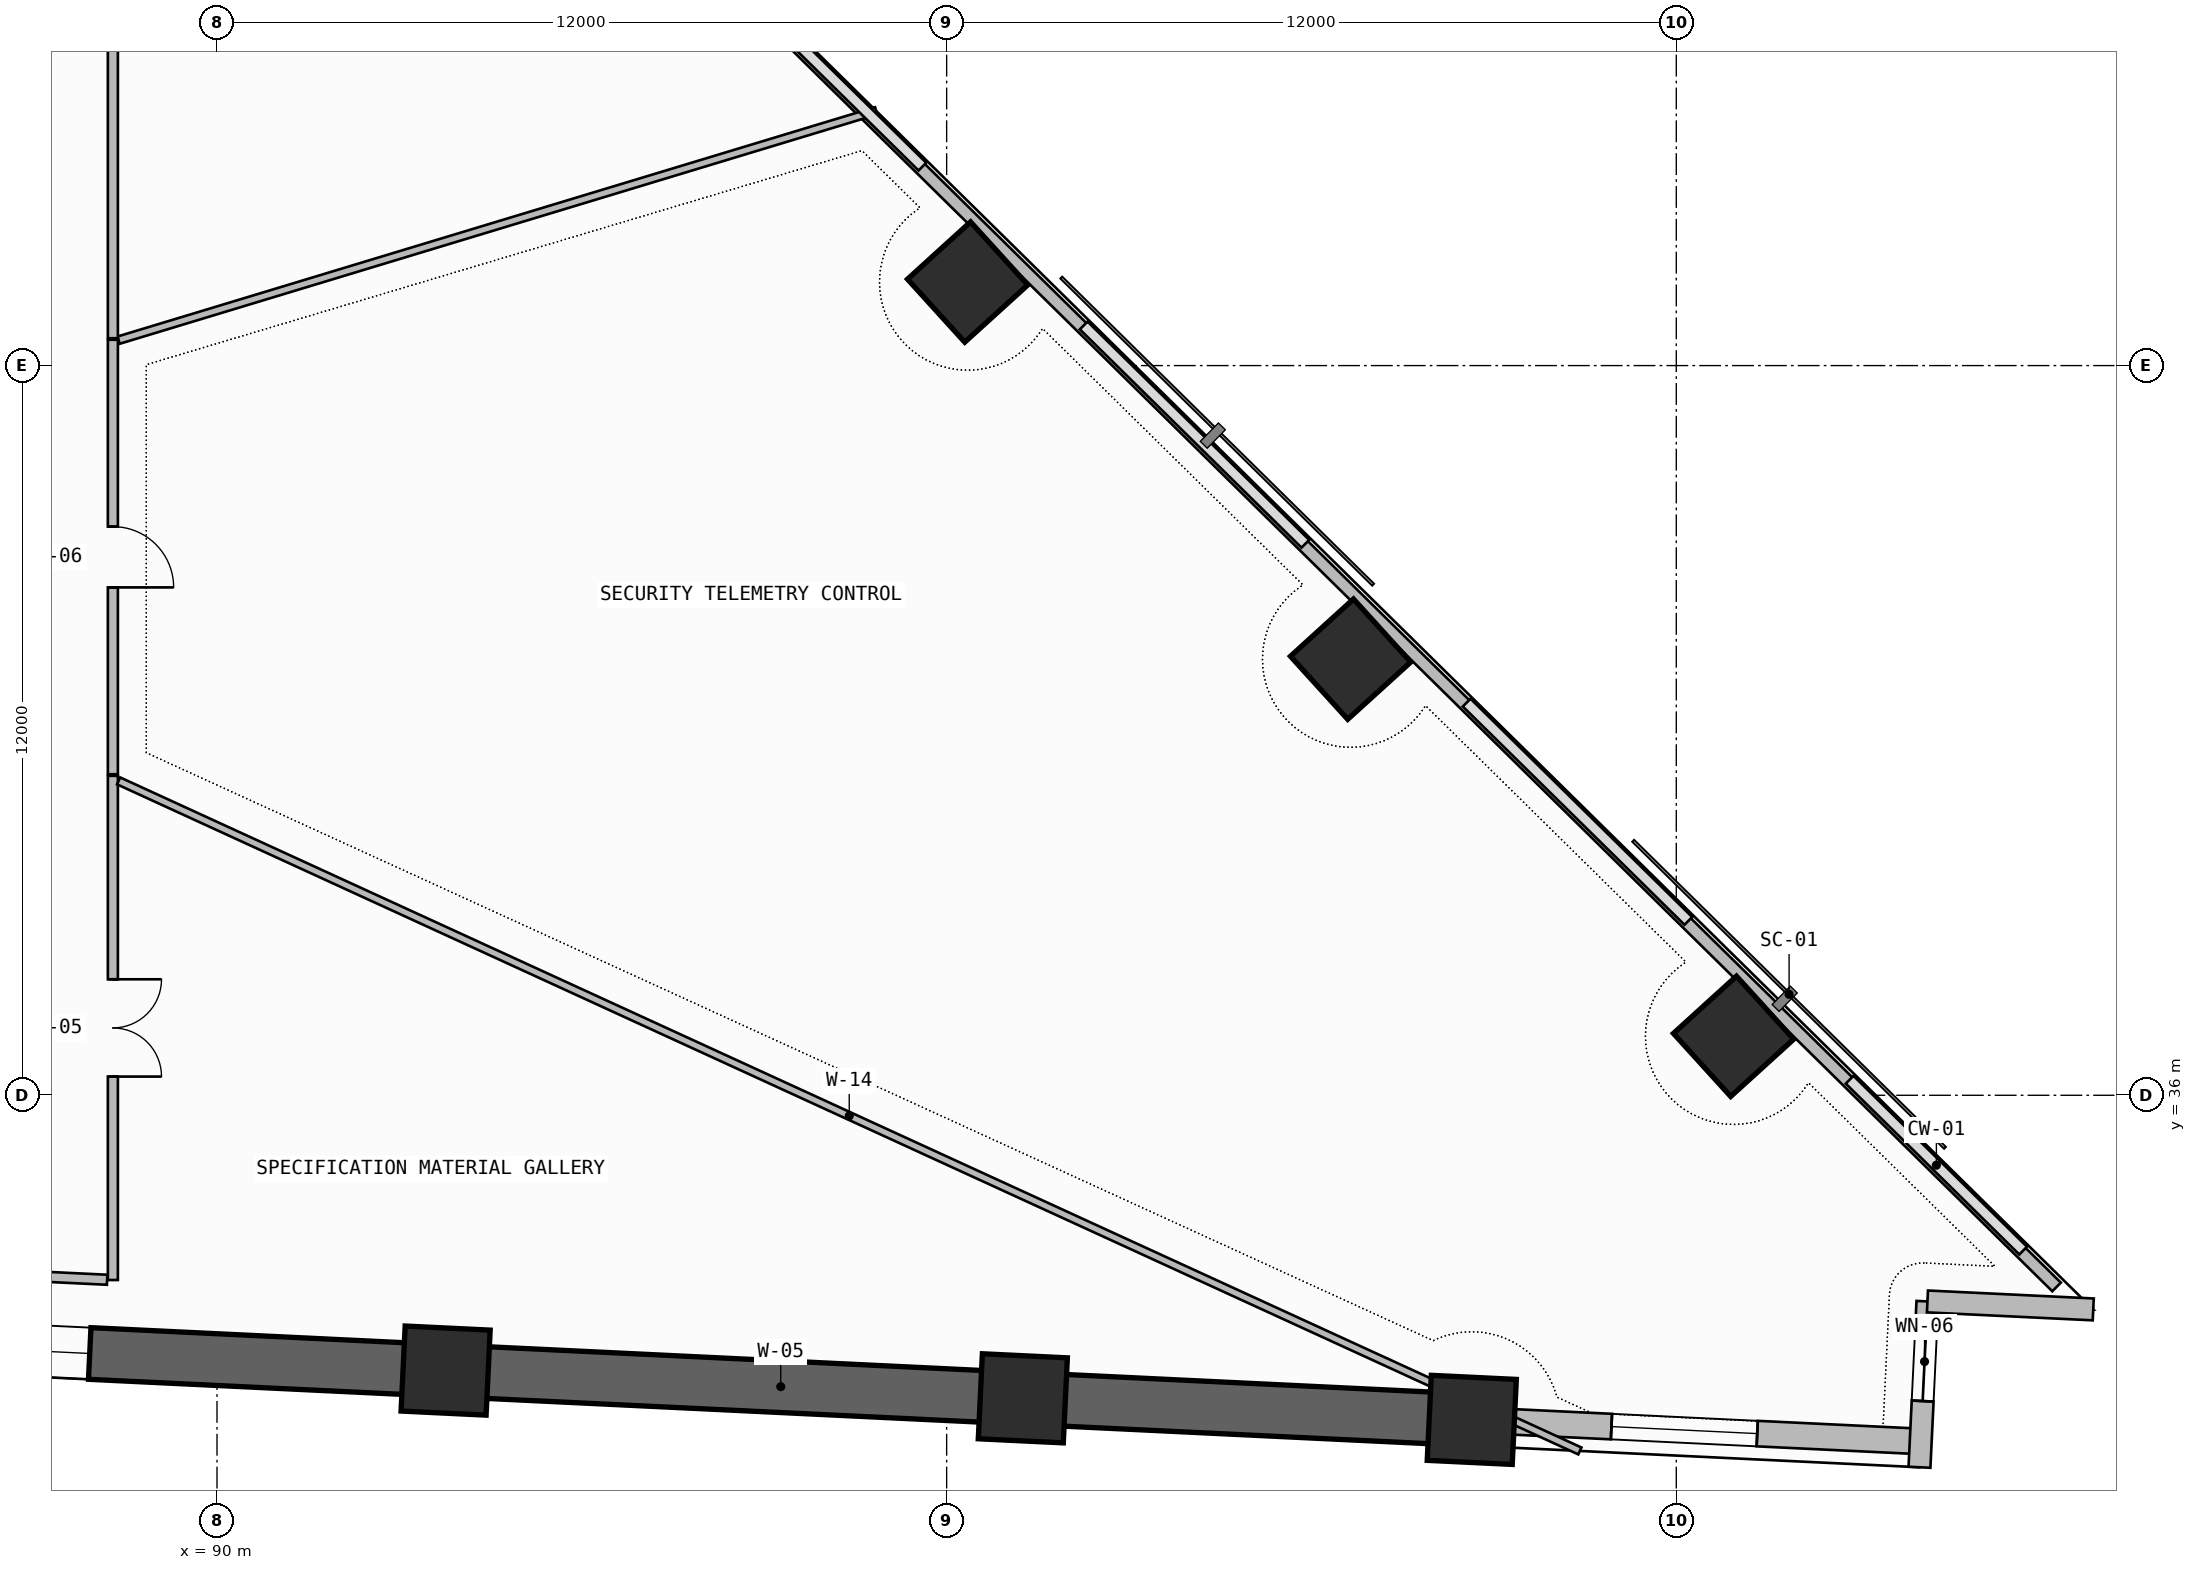
"""IFC4 building model, lengths in metres.
Left out: names, types, materials, properties, quantities, classifications, styles, units other than length and angle.
Written with IfcOpenShell. Run it as: python <this file> out.ifc"""

import sys

from ifc_helpers import new_model, si_unit, direction, frame, frame_2d, origin, origin_2d, place, context, subcontext, project, spatial, rectangle, extrude, element, fill, save


model = new_model("IFC4")
c1 = context("Model", 3, precision=1e-05, world=origin(), true_north=direction((0.0, 1.0)))
c2 = subcontext(c1, "Body", "Model", "MODEL_VIEW")
j1 = project(units=[si_unit("LENGTHUNIT", "METRE"), si_unit("PLANEANGLEUNIT", "RADIAN")], contexts=[c1])
p1 = place(None, origin())
s1 = spatial("IfcSite", under=j1, at=p1, CompositionType="ELEMENT")
p2 = place(p1, origin())
s2 = spatial("IfcBuilding", under=s1, at=p2, CompositionType="ELEMENT")
p3 = place(p2, frame((0.0, 0.0, 44.7)))
s3 = spatial("IfcBuildingStorey", under=s2, at=p3, CompositionType="ELEMENT", Elevation=44.7)
for number, where, z_axis, x_axis in (
    (1, (93.76, 31.472, 0.0), (0.0, 0.0, 1.0), (-0.999, 0.048, 0.0)),
    (2, (103.253, 31.017, 0.0), (0.0, 0.0, 1.0), (-0.999, 0.048, 0.0)),
    (3, (110.636, 30.662, 0.0), (0.0, 0.0, 1.0), (-0.999, 0.048, 0.0)),
    (4, (114.942, 36.97, 0.0), (0.0, 0.0, 1.0), (0.74, 0.672, 0.0)),
    (5, (108.644, 43.172, 0.0), (0.0, 0.0, 1.0), (0.74, 0.672, 0.0)),
    (6, (102.345, 49.374, 0.0), (0.0, 0.0, 1.0), (0.74, 0.672, 0.0)),
):
    element("IfcColumn", number, at=place(p3, frame(where, z_axis=z_axis, x_axis=x_axis)), inside=s3, PredefinedType="COLUMN", context=c2, shape_type="SweptSolid", body=[
        extrude(rectangle(XDim=1.4, YDim=1.4, at=origin_2d()), origin(), (0.0, 0.0, 1.0), 3.6),
    ])
p4 = place(p3, frame((83.212, 31.979, -0.2), z_axis=(0.0, 0.0, 1.0), x_axis=(0.998848235141, -0.047981279227, 0.0)))
e7 = element("IfcWall", 7, at=p4, inside=s3, PredefinedType="SHEAR", context=c2, shape_type="SweptSolid", body=[
    extrude(rectangle(XDim=27.456, YDim=0.85, at=frame_2d((13.728, 0.0))), origin(), (0.0, 0.0, 1.0), 3.54),
])
p5 = place(p4, frame((2.3, 0.0, 1.2)))
e8 = element("IfcOpeningElement", 8, at=p5, cuts=e7, PredefinedType="OPENING", context=c2, shape_type="SweptSolid", body=[
    extrude(rectangle(XDim=2.4, YDim=0.9, at=frame_2d((1.2, 0.45))), frame((0.0, 0.435, 0.0), z_axis=(0.0, -1.0, 0.0), x_axis=(1.0, 0.0, 0.0)), (0.0, 0.0, 1.0), 0.87),
])
p6 = place(p3, frame((110.636, 30.662, 0.0), z_axis=(0.0, 0.0, 1.0), x_axis=(0.998847872759, -0.047988822508, 0.0)))
e9 = element("IfcWall", 9, at=p6, inside=s3, PredefinedType="SOLIDWALL", context=c2, shape_type="SweptSolid", body=[
    extrude(rectangle(XDim=7.392, YDim=0.42, at=frame_2d((3.696, 0.0))), origin(), (0.0, 0.0, 1.0), 2.325),
])
p7 = place(p6, frame((2.3, 0.0, 1.2)))
e10 = element("IfcOpeningElement", 10, at=p7, cuts=e9, PredefinedType="OPENING", context=c2, shape_type="SweptSolid", body=[
    extrude(rectangle(XDim=2.4, YDim=0.9, at=frame_2d((1.2, 0.45))), frame((0.0, 0.22, 0.0), z_axis=(0.0, -1.0, 0.0), x_axis=(1.0, 0.0, 0.0)), (0.0, 0.0, 1.0), 0.44),
])
p8 = place(p3, frame((118.0, 29.883, 0.0), z_axis=(0.0, 0.0, 1.0), x_axis=(0.048024030708, 0.998846180588, 0.0)))
e11 = element("IfcWall", 11, at=p8, inside=s3, PredefinedType="SOLIDWALL", context=c2, shape_type="SweptSolid", body=[
    extrude(rectangle(XDim=2.73, YDim=0.36, at=frame_2d((1.365, 0.0))), origin(), (0.0, 0.0, 1.0), 3.34),
])
p9 = place(p8, frame((1.09, 0.0, 0.45)))
e12 = element("IfcOpeningElement", 12, at=p9, cuts=e11, PredefinedType="OPENING", context=c2, shape_type="SweptSolid", body=[
    extrude(rectangle(XDim=1.3, YDim=2.4, at=frame_2d((0.65, 1.2))), frame((0.0, 0.19, 0.0), z_axis=(0.0, -1.0, 0.0), x_axis=(1.0, 0.0, 0.0)), (0.0, 0.0, 1.0), 0.38),
])
p10 = place(p3, frame((118.131, 32.61, 0.0), z_axis=(0.0, 0.0, 1.0), x_axis=(0.998846180588, -0.048024030708, 0.0)))
e13 = element("IfcWall", 13, at=p10, inside=s3, PredefinedType="SOLIDWALL", context=c2, shape_type="SweptSolid", body=[
    extrude(rectangle(XDim=2.73, YDim=0.36, at=frame_2d((1.365, 0.0))), origin(), (0.0, 0.0, 1.0), 3.34),
])
p11 = place(p3, frame((120.254, 32.848, 0.0), z_axis=(0.0, 0.0, 1.0), x_axis=(-0.71254385441, 0.701627576099, 0.0)))
e14 = element("IfcWall", 14, at=p11, inside=s3, PredefinedType="PARAPET", context=c2, shape_type="SweptSolid", body=[
    extrude(rectangle(XDim=36.142, YDim=0.2, at=frame_2d((18.071, 0.0))), origin(), (0.0, 0.0, 1.0), 1.15),
])
p12 = place(p3, frame((88.288, 32.962, 0.0), z_axis=(0.0, 0.0, 1.0), x_axis=(0.0, 1.0, 0.0)))
e15 = element("IfcWall", 15, at=p12, inside=s3, PredefinedType="PARTITIONING", context=c2, shape_type="SweptSolid", body=[
    extrude(rectangle(XDim=8.291, YDim=0.165, at=frame_2d((4.146, 0.0))), origin(), (0.0, 0.0, 1.0), 2.725),
])
p13 = place(p12, frame((3.346, 0.0, 0.0)))
e16 = element("IfcOpeningElement", 16, at=p13, cuts=e15, PredefinedType="OPENING", context=c2, shape_type="SweptSolid", body=[
    extrude(rectangle(XDim=1.6, YDim=2.3, at=frame_2d((0.8, 1.15))), frame((0.0, 0.093, 0.0), z_axis=(0.0, -1.0, 0.0), x_axis=(1.0, 0.0, 0.0)), (0.0, 0.0, 1.0), 0.185),
])
p14 = place(p3, frame((86.3, 33.057, 0.0), z_axis=(0.0, 0.0, 1.0), x_axis=(0.9988449969, -0.048048643777, 0.0)))
e17 = element("IfcWall", 17, at=p14, inside=s3, PredefinedType="PARTITIONING", context=c2, shape_type="SweptSolid", body=[
    extrude(rectangle(XDim=1.895, YDim=0.165, at=frame_2d((0.948, 0.0))), origin(), (0.0, 0.0, 1.0), 3.34),
])
p15 = place(p3, frame((88.382, 41.17, 0.0), z_axis=(0.0, 0.0, 1.0), x_axis=(0.908996896227, -0.416802882248, 0.0)))
e18 = element("IfcWall", 18, at=p15, inside=s3, PredefinedType="PARTITIONING", context=c2, shape_type="SweptSolid", body=[
    extrude(rectangle(XDim=26.438, YDim=0.125, at=frame_2d((13.219, 0.0))), origin(), (0.0, 0.0, 1.0), 2.325),
])
p16 = place(p3, frame((88.288, 41.28, 0.0), z_axis=(0.0, 0.0, 1.0), x_axis=(0.0, 1.0, 0.0)))
e19 = element("IfcWall", 19, at=p16, inside=s3, PredefinedType="PARTITIONING", context=c2, shape_type="SweptSolid", body=[
    extrude(rectangle(XDim=7.145, YDim=0.165, at=frame_2d((3.573, 0.0))), origin(), (0.0, 0.0, 1.0), 2.725),
])
p17 = place(p16, frame((3.073, 0.0, 0.0)))
e20 = element("IfcOpeningElement", 20, at=p17, cuts=e19, PredefinedType="OPENING", context=c2, shape_type="SweptSolid", body=[
    extrude(rectangle(XDim=1.0, YDim=2.2, at=frame_2d((0.5, 1.1))), frame((0.0, 0.093, 0.0), z_axis=(0.0, -1.0, 0.0), x_axis=(1.0, 0.0, 0.0)), (0.0, 0.0, 1.0), 0.185),
])
p18 = place(p3, frame((88.382, 48.418, 0.0), z_axis=(0.0, 0.0, 1.0), x_axis=(0.957118216814, 0.289697633823, 0.0)))
e21 = element("IfcWall", 21, at=p18, inside=s3, PredefinedType="PARTITIONING", context=c2, shape_type="SweptSolid", body=[
    extrude(rectangle(XDim=13.016, YDim=0.125, at=frame_2d((6.508, 0.0))), origin(), (0.0, 0.0, 1.0), 2.725),
])
p19 = place(p3, frame((88.288, 48.45, 0.0), z_axis=(0.0, 0.0, 1.0), x_axis=(0.0, 1.0, 0.0)))
e22 = element("IfcWall", 22, at=p19, inside=s3, PredefinedType="PARTITIONING", context=c2, shape_type="SweptSolid", body=[
    extrude(rectangle(XDim=10.61, YDim=0.165, at=frame_2d((5.305, 0.0))), origin(), (0.0, 0.0, 1.0), 2.725),
])
p20 = place(p19, frame((4.805, 0.0, 0.0)))
e23 = element("IfcOpeningElement", 23, at=p20, cuts=e22, PredefinedType="OPENING", context=c2, shape_type="SweptSolid", body=[
    extrude(rectangle(XDim=1.0, YDim=2.2, at=frame_2d((0.5, 1.1))), frame((0.0, 0.093, 0.0), z_axis=(0.0, -1.0, 0.0), x_axis=(1.0, 0.0, 0.0)), (0.0, 0.0, 1.0), 0.185),
])
p21 = place(p5, origin())
e24 = element("IfcWindow", 24, at=p21, inside=s3, PartitioningType="SINGLE_PANEL", PredefinedType="WINDOW", context=c2, shape_type="SweptSolid", body=[
    extrude(rectangle(XDim=2.4, YDim=0.9, at=frame_2d((1.2, 0.45))), frame((0.0, 0.03, 0.0), z_axis=(0.0, -1.0, 0.0), x_axis=(1.0, 0.0, 0.0)), (0.0, 0.0, 1.0), 0.06),
])
fill(e8, e24)
p22 = place(p7, origin())
e25 = element("IfcWindow", 25, at=p22, inside=s3, PartitioningType="SINGLE_PANEL", PredefinedType="WINDOW", context=c2, shape_type="SweptSolid", body=[
    extrude(rectangle(XDim=2.4, YDim=0.9, at=frame_2d((1.2, 0.45))), frame((0.0, 0.03, 0.0), z_axis=(0.0, -1.0, 0.0), x_axis=(1.0, 0.0, 0.0)), (0.0, 0.0, 1.0), 0.06),
])
fill(e10, e25)
p23 = place(p9, origin())
e26 = element("IfcWindow", 26, at=p23, inside=s3, PartitioningType="SINGLE_PANEL", PredefinedType="WINDOW", context=c2, shape_type="SweptSolid", body=[
    extrude(rectangle(XDim=1.3, YDim=2.4, at=frame_2d((0.65, 1.2))), frame((0.0, 0.03, 0.0), z_axis=(0.0, -1.0, 0.0), x_axis=(1.0, 0.0, 0.0)), (0.0, 0.0, 1.0), 0.06),
])
fill(e12, e26)
p24 = place(p13, frame((1.6, 0.0, 0.0), z_axis=(0.0, 0.0, 1.0), x_axis=(-1.0, 0.0, 0.0)))
e27 = element("IfcDoor", 27, at=p24, inside=s3, OperationType="DOUBLE_DOOR_SINGLE_SWING", PredefinedType="DOOR", context=c2, shape_type="SweptSolid", body=[
    extrude(rectangle(XDim=1.6, YDim=2.3, at=frame_2d((0.8, 1.15))), frame((0.0, 0.025, 0.0), z_axis=(0.0, -1.0, 0.0), x_axis=(1.0, 0.0, 0.0)), (0.0, 0.0, 1.0), 0.05),
])
fill(e16, e27)
p25 = place(p17, frame((1.0, 0.0, 0.0), z_axis=(0.0, 0.0, 1.0), x_axis=(-1.0, 0.0, 0.0)))
e28 = element("IfcDoor", 28, at=p25, inside=s3, OperationType="SINGLE_SWING_RIGHT", PredefinedType="DOOR", context=c2, shape_type="SweptSolid", body=[
    extrude(rectangle(XDim=1.0, YDim=2.2, at=frame_2d((0.5, 1.1))), frame((0.0, 0.025, 0.0), z_axis=(0.0, -1.0, 0.0), x_axis=(1.0, 0.0, 0.0)), (0.0, 0.0, 1.0), 0.05),
])
fill(e20, e28)
save(model, sys.argv[1])
